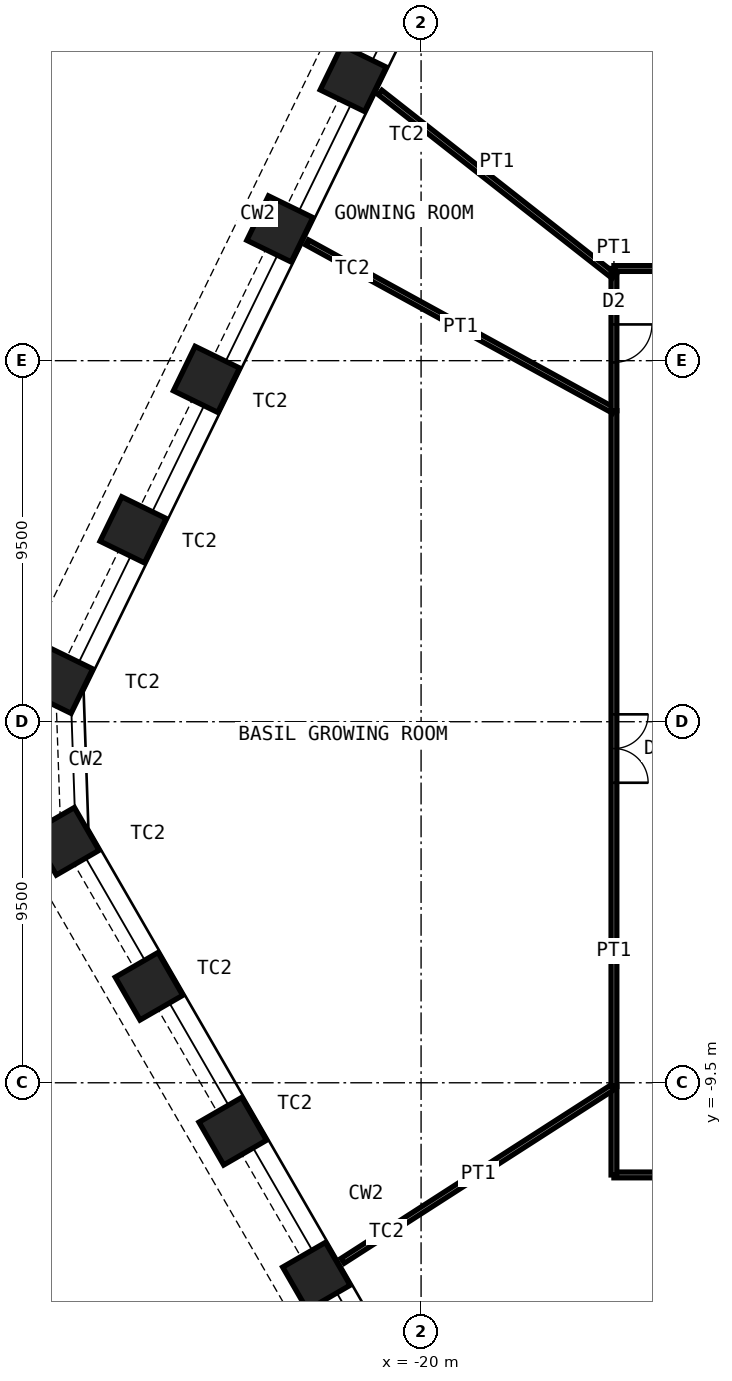
"""IFC4 building model, lengths in metres.
Left out: names, types, materials, properties, quantities, classifications, styles, units other than length and angle.
Written with IfcOpenShell. Run it as: python <this file> out.ifc"""

import sys

from ifc_helpers import new_model, si_unit, direction, frame, frame_2d, origin, origin_2d, place, context, subcontext, project, spatial, rectangle, hollow_rectangle, extrude, element, fill, save


model = new_model("IFC4")
c1 = context("Model", 3, precision=1e-05, world=origin(), true_north=direction((0.0, 1.0)))
c2 = subcontext(c1, "Body", "Model", "MODEL_VIEW")
j1 = project(units=[si_unit("LENGTHUNIT", "METRE"), si_unit("PLANEANGLEUNIT", "RADIAN")], contexts=[c1])
p1 = place(None, origin())
s1 = spatial("IfcSite", under=j1, at=p1, CompositionType="ELEMENT")
p2 = place(p1, origin())
s2 = spatial("IfcBuilding", under=s1, at=p2, CompositionType="ELEMENT")
p3 = place(p2, frame((0.0, 0.0, 57.0)))
s3 = spatial("IfcBuildingStorey", under=s2, at=p3, CompositionType="ELEMENT", Elevation=57.0)
for number, where, z_axis, x_axis in (
    (1, (-22.754, -14.589, 0.0), (0.0, 0.0, 1.0), (0.5, -0.866, 0.0)),
    (2, (-24.956, -10.775, 0.0), (0.0, 0.0, 1.0), (0.5, -0.866, 0.0)),
    (3, (-27.158, -6.96, 0.0), (0.0, 0.0, 1.0), (0.5, -0.866, 0.0)),
    (4, (-29.361, -3.146, 0.0), (0.0, 0.0, 1.0), (0.5, -0.866, 0.0)),
    (5, (-29.509, 1.09, 0.0), (0.0, 0.0, 1.0), (-0.438, -0.899, 0.0)),
    (6, (-27.578, 5.049, 0.0), (0.0, 0.0, 1.0), (-0.438, -0.899, 0.0)),
    (7, (-25.647, 9.008, 0.0), (0.0, 0.0, 1.0), (-0.438, -0.899, 0.0)),
    (8, (-23.716, 12.966, 0.0), (0.0, 0.0, 1.0), (-0.438, -0.899, 0.0)),
    (9, (-21.785, 16.925, 0.0), (0.0, 0.0, 1.0), (-0.438, -0.899, 0.0)),
):
    element("IfcColumn", number, at=place(p3, frame(where, z_axis=z_axis, x_axis=x_axis)), inside=s3, PredefinedType="COLUMN", context=c2, shape_type="SweptSolid", body=[
        extrude(hollow_rectangle(XDim=1.3, YDim=1.3, WallThickness=0.1, at=origin_2d()), origin(), (0.0, 0.0, 1.0), 5.0),
    ])
p4 = place(p3, frame((-5.516, -11.925, 0.0), z_axis=(0.0, 0.0, 1.0), x_axis=(-1.0, 0.0, 0.0)))
e10 = element("IfcWall", 10, at=p4, inside=s3, PredefinedType="PARTITIONING", context=c2, shape_type="SweptSolid", body=[
    extrude(rectangle(XDim=9.409, YDim=0.15, at=frame_2d((4.705, 0.0))), origin(), (0.0, 0.0, 1.0), 4.8),
])
p5 = place(p4, frame((3.805, 0.0, 0.0)))
e11 = element("IfcOpeningElement", 11, at=p5, cuts=e10, PredefinedType="OPENING", context=c2, shape_type="SweptSolid", body=[
    extrude(rectangle(XDim=1.8, YDim=2.4, at=frame_2d((0.9, 1.2))), frame((0.0, 0.085, 0.0), z_axis=(0.0, -1.0, 0.0), x_axis=(1.0, 0.0, 0.0)), (0.0, 0.0, 1.0), 0.17),
])
p6 = place(p3, frame((-14.925, -11.925, 0.0), z_axis=(0.0, 0.0, 1.0), x_axis=(0.0, 1.0, 0.0)))
e12 = element("IfcWall", 12, at=p6, inside=s3, PredefinedType="PARTITIONING", context=c2, shape_type="SweptSolid", body=[
    extrude(rectangle(XDim=2.329, YDim=0.15, at=frame_2d((1.165, 0.0))), origin(), (0.0, 0.0, 1.0), 4.8),
])
p7 = place(p3, frame((-22.063, -14.185, 0.0), z_axis=(0.0, 0.0, 1.0), x_axis=(0.841158845851, 0.540788124912, 0.0)))
e13 = element("IfcWall", 13, at=p7, inside=s3, PredefinedType="PARTITIONING", context=c2, shape_type="SweptSolid", body=[
    extrude(rectangle(XDim=8.486, YDim=0.15, at=frame_2d((4.243, 0.0))), origin(), (0.0, 0.0, 1.0), 3.7),
])
p8 = place(p3, frame((-14.925, -9.596, 0.0), z_axis=(0.0, 0.0, 1.0), x_axis=(0.0, 1.0, 0.0)))
e14 = element("IfcWall", 14, at=p8, inside=s3, PredefinedType="PARTITIONING", context=c2, shape_type="SweptSolid", body=[
    extrude(rectangle(XDim=17.78, YDim=0.15, at=frame_2d((8.89, 0.0))), origin(), (0.0, 0.0, 1.0), 4.8),
])
p9 = place(p8, frame((7.99, 0.0, 0.0)))
e15 = element("IfcOpeningElement", 15, at=p9, cuts=e14, PredefinedType="OPENING", context=c2, shape_type="SweptSolid", body=[
    extrude(rectangle(XDim=1.8, YDim=2.4, at=frame_2d((0.9, 1.2))), frame((0.0, 0.085, 0.0), z_axis=(0.0, -1.0, 0.0), x_axis=(1.0, 0.0, 0.0)), (0.0, 0.0, 1.0), 0.17),
])
p10 = place(p3, frame((-22.999, 12.612, 0.0), z_axis=(0.0, 0.0, 1.0), x_axis=(0.876826470608, -0.480806967963, 0.0)))
e16 = element("IfcWall", 16, at=p10, inside=s3, PredefinedType="PARTITIONING", context=c2, shape_type="SweptSolid", body=[
    extrude(rectangle(XDim=9.208, YDim=0.15, at=frame_2d((4.604, 0.0))), origin(), (0.0, 0.0, 1.0), 3.7),
])
p11 = place(p3, frame((-14.925, 8.184, 0.0), z_axis=(0.0, 0.0, 1.0), x_axis=(0.0, 1.0, 0.0)))
e17 = element("IfcWall", 17, at=p11, inside=s3, PredefinedType="PARTITIONING", context=c2, shape_type="SweptSolid", body=[
    extrude(rectangle(XDim=3.54, YDim=0.15, at=frame_2d((1.77, 0.0))), origin(), (0.0, 0.0, 1.0), 4.8),
])
p12 = place(p11, frame((1.27, 0.0, 0.0)))
e18 = element("IfcOpeningElement", 18, at=p12, cuts=e17, PredefinedType="OPENING", context=c2, shape_type="SweptSolid", body=[
    extrude(rectangle(XDim=1.0, YDim=2.4, at=frame_2d((0.5, 1.2))), frame((0.0, 0.085, 0.0), z_axis=(0.0, -1.0, 0.0), x_axis=(1.0, 0.0, 0.0)), (0.0, 0.0, 1.0), 0.17),
])
p13 = place(p3, frame((-21.077, 16.557, 0.0), z_axis=(0.0, 0.0, 1.0), x_axis=(0.78639413325, -0.617725074115, 0.0)))
e19 = element("IfcWall", 19, at=p13, inside=s3, PredefinedType="PARTITIONING", context=c2, shape_type="SweptSolid", body=[
    extrude(rectangle(XDim=7.823, YDim=0.15, at=frame_2d((3.912, 0.0))), origin(), (0.0, 0.0, 1.0), 3.7),
])
p14 = place(p3, frame((-14.925, 11.819, 0.0), z_axis=(0.0, 0.0, 1.0), x_axis=(0.0, 1.0, 0.0)))
e20 = element("IfcWall", 20, at=p14, inside=s3, PredefinedType="PARTITIONING", context=c2, shape_type="SweptSolid", body=[
    extrude(rectangle(XDim=0.106, YDim=0.15, at=frame_2d((0.053, 0.0))), origin(), (0.0, 0.0, 1.0), 4.8),
])
p15 = place(p3, frame((-14.925, 11.925, 0.0), z_axis=(0.0, 0.0, 1.0), x_axis=(1.0, 0.0, 0.0)))
e21 = element("IfcWall", 21, at=p15, inside=s3, PredefinedType="PARTITIONING", context=c2, shape_type="SweptSolid", body=[
    extrude(rectangle(XDim=10.361, YDim=0.15, at=frame_2d((5.18, 0.0))), origin(), (0.0, 0.0, 1.0), 4.8),
])
p16 = place(p15, frame((4.28, 0.0, 0.0)))
e22 = element("IfcOpeningElement", 22, at=p16, cuts=e21, PredefinedType="OPENING", context=c2, shape_type="SweptSolid", body=[
    extrude(rectangle(XDim=1.8, YDim=2.4, at=frame_2d((0.9, 1.2))), frame((0.0, 0.085, 0.0), z_axis=(0.0, -1.0, 0.0), x_axis=(1.0, 0.0, 0.0)), (0.0, 0.0, 1.0), 0.17),
])
p17 = place(p9, origin())
e23 = element("IfcDoor", 23, at=p17, inside=s3, OperationType="DOUBLE_DOOR_DOUBLE_SWING", PredefinedType="DOOR", context=c2, shape_type="SweptSolid", body=[
    extrude(rectangle(XDim=1.8, YDim=2.4, at=frame_2d((0.9, 1.2))), frame((0.0, 0.025, 0.0), z_axis=(0.0, -1.0, 0.0), x_axis=(1.0, 0.0, 0.0)), (0.0, 0.0, 1.0), 0.05),
])
fill(e15, e23)
p18 = place(p12, origin())
e24 = element("IfcDoor", 24, at=p18, inside=s3, OperationType="SINGLE_SWING_RIGHT", PredefinedType="DOOR", context=c2, shape_type="SweptSolid", body=[
    extrude(rectangle(XDim=1.0, YDim=2.4, at=frame_2d((0.5, 1.2))), frame((0.0, 0.025, 0.0), z_axis=(0.0, -1.0, 0.0), x_axis=(1.0, 0.0, 0.0)), (0.0, 0.0, 1.0), 0.05),
])
fill(e18, e24)
save(model, sys.argv[1])
